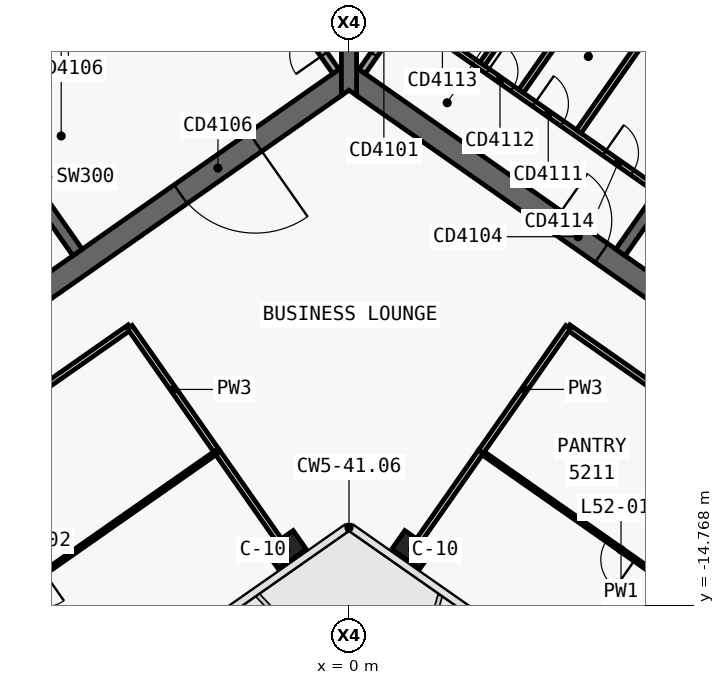
"""IFC4 building model, lengths in metres.
Left out: names, types, materials, properties, quantities, classifications, styles, units other than length and angle.
Written with IfcOpenShell. Run it as: python <this file> out.ifc"""

import sys

from ifc_helpers import new_model, si_unit, direction, frame, frame_2d, origin, origin_2d, place, context, subcontext, project, spatial, polyline, rectangle, outline, extrude, element, fill, save


model = new_model("IFC4")
c1 = context("Model", 3, precision=1e-05, world=origin(), true_north=direction((0.0, 1.0)))
c2 = subcontext(c1, "Body", "Model", "MODEL_VIEW")
j1 = project(units=[si_unit("LENGTHUNIT", "METRE"), si_unit("PLANEANGLEUNIT", "RADIAN")], contexts=[c1])
p1 = place(None, origin())
s1 = spatial("IfcSite", under=j1, at=p1, CompositionType="ELEMENT")
p2 = place(p1, origin())
s2 = spatial("IfcBuilding", under=s1, at=p2, CompositionType="ELEMENT")
p3 = place(p2, frame((0.0, 0.0, 225.4)))
s3 = spatial("IfcBuildingStorey", under=s2, at=p3, CompositionType="ELEMENT", Elevation=225.4)
p4 = place(p3, frame((-0.028, 12.066, 0.0), z_axis=(0.0, 0.0, 1.0), x_axis=(-0.819151382952, -0.573577380837, 0.0)))
e1 = element("IfcWall", 1, at=p4, inside=s3, PredefinedType="SHEAR", context=c2, shape_type="SweptSolid", body=[
    extrude(outline(polyline([(33.898, 0.3), (0.42, 0.3), (0.0, -0.3), (33.898, -0.3), (33.898, 0.3)])), origin(), (0.0, 0.0, 1.0), 3.9),
])
p5 = place(p3, frame((-0.028, -0.874, 0.0), z_axis=(0.0, 0.0, 1.0), x_axis=(-0.819150035022, -0.573579305871, 0.0)))
e2 = element("IfcWall", 2, at=p5, inside=s3, PredefinedType="SHEAR", context=c2, shape_type="SweptSolid", body=[
    extrude(outline(polyline([(26.476, 0.3), (0.42, 0.3), (0.0, -0.3), (26.476, -0.3), (26.476, 0.3)])), origin(), (0.0, 0.0, 1.0), 3.9),
])
p6 = place(p5, frame((2.976, 0.0, 0.0)))
e3 = element("IfcOpeningElement", 3, at=p6, cuts=e2, PredefinedType="OPENING", context=c2, shape_type="SweptSolid", body=[
    extrude(rectangle(XDim=2.4, YDim=2.1, at=frame_2d((1.2, 1.05))), frame((0.0, 0.31, 0.0), z_axis=(0.0, -1.0, 0.0), x_axis=(1.0, 0.0, 0.0)), (0.0, 0.0, 1.0), 0.62),
])
p7 = place(p5, frame((11.776, 0.0, 0.0)))
e4 = element("IfcOpeningElement", 4, at=p7, cuts=e2, PredefinedType="OPENING", context=c2, shape_type="SweptSolid", body=[
    extrude(rectangle(XDim=2.4, YDim=2.1, at=frame_2d((1.2, 1.05))), frame((0.0, 0.31, 0.0), z_axis=(0.0, -1.0, 0.0), x_axis=(1.0, 0.0, 0.0)), (0.0, 0.0, 1.0), 0.62),
])
p8 = place(p3, frame((-7.143, -5.49, 0.0), z_axis=(0.0, 0.0, 1.0), x_axis=(-0.573617744349, 0.819123118565, 0.0)))
e5 = element("IfcWall", 5, at=p8, inside=s3, PredefinedType="SHEAR", context=c2, shape_type="SweptSolid", body=[
    extrude(outline(polyline([(4.85, 0.15), (0.0, 0.15), (0.0, -0.15), (4.85, -0.15), (4.85, 0.15)])), origin(), (0.0, 0.0, 1.0), 3.9),
])
p9 = place(p3, frame((-2.638, 3.768, 0.0), z_axis=(0.0, 0.0, 1.0), x_axis=(-0.819155014212, -0.573572194837, 0.0)))
e6 = element("IfcWall", 6, at=p9, inside=s3, PredefinedType="SHEAR", context=c2, shape_type="SweptSolid", body=[
    extrude(outline(polyline([(26.4, 0.15), (0.0, 0.15), (0.0, -0.15), (26.4, -0.15), (26.4, 0.15)])), origin(), (0.0, 0.0, 1.0), 3.9),
])
p10 = place(p9, frame((1.169, 0.0, 0.0)))
e7 = element("IfcOpeningElement", 7, at=p10, cuts=e6, PredefinedType="OPENING", context=c2, shape_type="SweptSolid", body=[
    extrude(rectangle(XDim=1.1, YDim=2.1, at=frame_2d((0.55, 1.05))), frame((0.0, 0.16, 0.0), z_axis=(0.0, -1.0, 0.0), x_axis=(1.0, 0.0, 0.0)), (0.0, 0.0, 1.0), 0.32),
])
p11 = place(p9, frame((3.206, 0.0, 0.0)))
e8 = element("IfcOpeningElement", 8, at=p11, cuts=e6, PredefinedType="OPENING", context=c2, shape_type="SweptSolid", body=[
    extrude(rectangle(XDim=1.1, YDim=2.1, at=frame_2d((0.55, 1.05))), frame((0.0, 0.16, 0.0), z_axis=(0.0, -1.0, 0.0), x_axis=(1.0, 0.0, 0.0)), (0.0, 0.0, 1.0), 0.32),
])
p12 = place(p9, frame((5.244, 0.0, 0.0)))
e9 = element("IfcOpeningElement", 9, at=p12, cuts=e6, PredefinedType="OPENING", context=c2, shape_type="SweptSolid", body=[
    extrude(rectangle(XDim=1.1, YDim=2.1, at=frame_2d((0.55, 1.05))), frame((0.0, 0.16, 0.0), z_axis=(0.0, -1.0, 0.0), x_axis=(1.0, 0.0, 0.0)), (0.0, 0.0, 1.0), 0.32),
])
p13 = place(p9, frame((7.281, 0.0, 0.0)))
e10 = element("IfcOpeningElement", 10, at=p13, cuts=e6, PredefinedType="OPENING", context=c2, shape_type="SweptSolid", body=[
    extrude(rectangle(XDim=1.1, YDim=2.1, at=frame_2d((0.55, 1.05))), frame((0.0, 0.16, 0.0), z_axis=(0.0, -1.0, 0.0), x_axis=(1.0, 0.0, 0.0)), (0.0, 0.0, 1.0), 0.32),
])
p14 = place(p9, frame((9.688, 0.0, 0.0)))
e11 = element("IfcOpeningElement", 11, at=p14, cuts=e6, PredefinedType="OPENING", context=c2, shape_type="SweptSolid", body=[
    extrude(rectangle(XDim=1.1, YDim=2.1, at=frame_2d((0.55, 1.05))), frame((0.0, 0.16, 0.0), z_axis=(0.0, -1.0, 0.0), x_axis=(1.0, 0.0, 0.0)), (0.0, 0.0, 1.0), 0.32),
])
p15 = place(p9, frame((11.863, 0.0, 0.0)))
e12 = element("IfcOpeningElement", 12, at=p15, cuts=e6, PredefinedType="OPENING", context=c2, shape_type="SweptSolid", body=[
    extrude(rectangle(XDim=1.1, YDim=2.1, at=frame_2d((0.55, 1.05))), frame((0.0, 0.16, 0.0), z_axis=(0.0, -1.0, 0.0), x_axis=(1.0, 0.0, 0.0)), (0.0, 0.0, 1.0), 0.32),
])
p16 = place(p9, frame((14.552, 0.0, 0.0)))
e13 = element("IfcOpeningElement", 13, at=p16, cuts=e6, PredefinedType="OPENING", context=c2, shape_type="SweptSolid", body=[
    extrude(rectangle(XDim=1.0, YDim=2.1, at=frame_2d((0.5, 1.05))), frame((0.0, 0.16, 0.0), z_axis=(0.0, -1.0, 0.0), x_axis=(1.0, 0.0, 0.0)), (0.0, 0.0, 1.0), 0.32),
])
p17 = place(p9, frame((16.627, 0.0, 0.0)))
e14 = element("IfcOpeningElement", 14, at=p17, cuts=e6, PredefinedType="OPENING", context=c2, shape_type="SweptSolid", body=[
    extrude(rectangle(XDim=1.0, YDim=2.1, at=frame_2d((0.5, 1.05))), frame((0.0, 0.16, 0.0), z_axis=(0.0, -1.0, 0.0), x_axis=(1.0, 0.0, 0.0)), (0.0, 0.0, 1.0), 0.32),
])
p18 = place(p3, frame((0.028, 12.066, 0.0), z_axis=(0.0, 0.0, 1.0), x_axis=(0.819151382952, -0.573577380837, 0.0)))
e15 = element("IfcWall", 15, at=p18, inside=s3, PredefinedType="SHEAR", context=c2, shape_type="SweptSolid", body=[
    extrude(outline(polyline([(33.898, 0.3), (0.0, 0.3), (0.42, -0.3), (33.898, -0.3), (33.898, 0.3)])), origin(), (0.0, 0.0, 1.0), 3.9),
])
p19 = place(p3, frame((0.028, -0.874, 0.0), z_axis=(0.0, 0.0, 1.0), x_axis=(0.819150035022, -0.573579305871, 0.0)))
e16 = element("IfcWall", 16, at=p19, inside=s3, PredefinedType="SHEAR", context=c2, shape_type="SweptSolid", body=[
    extrude(outline(polyline([(26.476, 0.3), (0.0, 0.3), (0.42, -0.3), (26.476, -0.3), (26.476, 0.3)])), origin(), (0.0, 0.0, 1.0), 3.9),
])
p20 = place(p19, frame((6.576, 0.0, 0.0)))
e17 = element("IfcOpeningElement", 17, at=p20, cuts=e16, PredefinedType="OPENING", context=c2, shape_type="SweptSolid", body=[
    extrude(rectangle(XDim=1.5, YDim=2.1, at=frame_2d((0.75, 1.05))), frame((0.0, 0.31, 0.0), z_axis=(0.0, -1.0, 0.0), x_axis=(1.0, 0.0, 0.0)), (0.0, 0.0, 1.0), 0.62),
])
p21 = place(p19, frame((12.226, 0.0, 0.0)))
e18 = element("IfcOpeningElement", 18, at=p21, cuts=e16, PredefinedType="OPENING", context=c2, shape_type="SweptSolid", body=[
    extrude(rectangle(XDim=1.5, YDim=2.1, at=frame_2d((0.75, 1.05))), frame((0.0, 0.31, 0.0), z_axis=(0.0, -1.0, 0.0), x_axis=(1.0, 0.0, 0.0)), (0.0, 0.0, 1.0), 0.62),
])
p22 = place(p3, frame((7.143, -5.49, 0.0), z_axis=(0.0, 0.0, 1.0), x_axis=(0.573617744349, 0.819123118565, 0.0)))
e19 = element("IfcWall", 19, at=p22, inside=s3, PredefinedType="SHEAR", context=c2, shape_type="SweptSolid", body=[
    extrude(outline(polyline([(0.0, 0.15), (0.0, -0.15), (4.85, -0.15), (4.85, 0.15), (0.0, 0.15)])), origin(), (0.0, 0.0, 1.0), 3.9),
])
p23 = place(p3, frame((2.638, 3.768, 0.0), z_axis=(0.0, 0.0, 1.0), x_axis=(0.819155014212, -0.573572194837, 0.0)))
e20 = element("IfcWall", 20, at=p23, inside=s3, PredefinedType="SHEAR", context=c2, shape_type="SweptSolid", body=[
    extrude(outline(polyline([(0.0, 0.15), (0.0, -0.15), (26.4, -0.15), (26.4, 0.15), (0.0, 0.15)])), origin(), (0.0, 0.0, 1.0), 3.9),
])
p24 = place(p23, frame((9.637, 0.0, 0.0)))
e21 = element("IfcOpeningElement", 21, at=p24, cuts=e20, PredefinedType="OPENING", context=c2, shape_type="SweptSolid", body=[
    extrude(rectangle(XDim=1.2, YDim=2.1, at=frame_2d((0.6, 1.05))), frame((0.0, 0.16, 0.0), z_axis=(0.0, -1.0, 0.0), x_axis=(1.0, 0.0, 0.0)), (0.0, 0.0, 1.0), 0.32),
])
p25 = place(p23, frame((11.812, 0.0, 0.0)))
e22 = element("IfcOpeningElement", 22, at=p25, cuts=e20, PredefinedType="OPENING", context=c2, shape_type="SweptSolid", body=[
    extrude(rectangle(XDim=1.2, YDim=2.1, at=frame_2d((0.6, 1.05))), frame((0.0, 0.16, 0.0), z_axis=(0.0, -1.0, 0.0), x_axis=(1.0, 0.0, 0.0)), (0.0, 0.0, 1.0), 0.32),
])
p26 = place(p23, frame((13.988, 0.0, 0.0)))
e23 = element("IfcOpeningElement", 23, at=p26, cuts=e20, PredefinedType="OPENING", context=c2, shape_type="SweptSolid", body=[
    extrude(rectangle(XDim=1.2, YDim=2.1, at=frame_2d((0.6, 1.05))), frame((0.0, 0.16, 0.0), z_axis=(0.0, -1.0, 0.0), x_axis=(1.0, 0.0, 0.0)), (0.0, 0.0, 1.0), 0.32),
])
p27 = place(p23, frame((16.262, 0.0, 0.0)))
e24 = element("IfcOpeningElement", 24, at=p27, cuts=e20, PredefinedType="OPENING", context=c2, shape_type="SweptSolid", body=[
    extrude(rectangle(XDim=1.0, YDim=2.1, at=frame_2d((0.5, 1.05))), frame((0.0, 0.16, 0.0), z_axis=(0.0, -1.0, 0.0), x_axis=(1.0, 0.0, 0.0)), (0.0, 0.0, 1.0), 0.32),
])
p28 = place(p3, frame((0.0, -1.361, 0.0), z_axis=(0.0, 0.0, 1.0), x_axis=(0.0, 1.0, 0.0)))
e25 = element("IfcWall", 25, at=p28, inside=s3, PredefinedType="SHEAR", context=c2, shape_type="SweptSolid", body=[
    extrude(outline(polyline([(0.14, 0.2), (0.0, 0.2), (0.14, 0.0), (0.0, -0.2), (0.14, -0.2), (1.012, -0.2), (12.94, -0.2), (13.813, -0.2), (13.893, -0.2), (13.933, -0.172), (13.813, 0.0), (13.933, 0.172), (13.893, 0.2), (13.813, 0.2), (12.94, 0.2), (1.012, 0.2), (0.14, 0.2)])), origin(), (0.0, 0.0, 1.0), 3.9),
])
for number, where, z_axis, x_axis in (
    (26, (-1.665, -13.313, 0.0), (0.0, 0.0, 1.0), (-0.819, -0.574, 0.0)),
    (27, (1.665, -13.313, 0.0), (0.0, 0.0, 1.0), (0.819, -0.574, 0.0)),
):
    element("IfcColumn", number, at=place(p3, frame(where, z_axis=z_axis, x_axis=x_axis)), inside=s3, PredefinedType="COLUMN", context=c2, shape_type="SweptSolid", body=[
        extrude(rectangle(XDim=0.9, YDim=0.6, at=origin_2d()), origin(), (0.0, 0.0, 1.0), 3.9),
    ])
p29 = place(p3, frame((1.516, 0.77, 0.0), z_axis=(0.0, 0.0, 1.0), x_axis=(0.819146424436, -0.573584462249, 0.0)))
e28 = element("IfcWall", 28, at=p29, inside=s3, PredefinedType="PARTITIONING", context=c2, shape_type="SweptSolid", body=[
    extrude(rectangle(XDim=8.05, YDim=0.15, at=frame_2d((4.025, 0.0))), origin(), (0.0, 0.0, 1.0), 3.62),
])
p30 = place(p29, frame((0.7, 0.0, 0.0)))
e29 = element("IfcOpeningElement", 29, at=p30, cuts=e28, PredefinedType="OPENING", context=c2, shape_type="SweptSolid", body=[
    extrude(rectangle(XDim=0.9, YDim=2.1, at=frame_2d((0.45, 1.05))), frame((0.0, 0.085, 0.0), z_axis=(0.0, -1.0, 0.0), x_axis=(1.0, 0.0, 0.0)), (0.0, 0.0, 1.0), 0.17),
])
p31 = place(p29, frame((2.6, 0.0, 0.0)))
e30 = element("IfcOpeningElement", 30, at=p31, cuts=e28, PredefinedType="OPENING", context=c2, shape_type="SweptSolid", body=[
    extrude(rectangle(XDim=0.8, YDim=2.1, at=frame_2d((0.4, 1.05))), frame((0.0, 0.085, 0.0), z_axis=(0.0, -1.0, 0.0), x_axis=(1.0, 0.0, 0.0)), (0.0, 0.0, 1.0), 0.17),
])
p32 = place(p29, frame((4.1, 0.0, 0.0)))
e31 = element("IfcOpeningElement", 31, at=p32, cuts=e28, PredefinedType="OPENING", context=c2, shape_type="SweptSolid", body=[
    extrude(rectangle(XDim=0.9, YDim=2.1, at=frame_2d((0.45, 1.05))), frame((0.0, 0.085, 0.0), z_axis=(0.0, -1.0, 0.0), x_axis=(1.0, 0.0, 0.0)), (0.0, 0.0, 1.0), 0.17),
])
p33 = place(p29, frame((6.35, 0.0, 0.0)))
e32 = element("IfcOpeningElement", 32, at=p33, cuts=e28, PredefinedType="OPENING", context=c2, shape_type="SweptSolid", body=[
    extrude(rectangle(XDim=0.9, YDim=2.1, at=frame_2d((0.45, 1.05))), frame((0.0, 0.085, 0.0), z_axis=(0.0, -1.0, 0.0), x_axis=(1.0, 0.0, 0.0)), (0.0, 0.0, 1.0), 0.17),
])
p34 = place(p3, frame((3.504, -0.531, 0.0), z_axis=(0.0, 0.0, 1.0), x_axis=(0.573582013179, 0.819148139324, 0.0)))
e33 = element("IfcWall", 33, at=p34, inside=s3, PredefinedType="PARTITIONING", context=c2, shape_type="SweptSolid", body=[
    extrude(rectangle(XDim=2.875, YDim=0.15, at=frame_2d((1.438, 0.0))), origin(), (0.0, 0.0, 1.0), 3.62),
])
p35 = place(p3, frame((4.528, -1.248, 0.0), z_axis=(0.0, 0.0, 1.0), x_axis=(0.573621911162, 0.819120200602, 0.0)))
e34 = element("IfcWall", 34, at=p35, inside=s3, PredefinedType="PARTITIONING", context=c2, shape_type="SweptSolid", body=[
    extrude(rectangle(XDim=2.875, YDim=0.15, at=frame_2d((1.438, 0.0))), origin(), (0.0, 0.0, 1.0), 3.62),
])
p36 = place(p3, frame((6.044, -2.309, 0.0), z_axis=(0.0, 0.0, 1.0), x_axis=(0.573564930514, 0.819160100642, 0.0)))
e35 = element("IfcWall", 35, at=p36, inside=s3, PredefinedType="PARTITIONING", context=c2, shape_type="SweptSolid", body=[
    extrude(rectangle(XDim=2.875, YDim=0.15, at=frame_2d((1.438, 0.0))), origin(), (0.0, 0.0, 1.0), 3.62),
])
p37 = place(p3, frame((-0.344, -0.729, 0.0), z_axis=(0.0, 0.0, 1.0), x_axis=(-0.573560315113, 0.819163332265, 0.0)))
e36 = element("IfcWall", 36, at=p37, inside=s3, PredefinedType="SOLIDWALL", context=c2, shape_type="SweptSolid", body=[
    extrude(rectangle(XDim=4.85, YDim=0.2, at=frame_2d((2.425, 0.0))), origin(), (0.0, 0.0, 1.0), 3.62),
])
p38 = place(p37, frame((0.55, 0.0, 0.0)))
e37 = element("IfcOpeningElement", 37, at=p38, cuts=e36, PredefinedType="OPENING", context=c2, shape_type="SweptSolid", body=[
    extrude(rectangle(XDim=0.9, YDim=2.1, at=frame_2d((0.45, 1.05))), frame((0.0, 0.11, 0.0), z_axis=(0.0, -1.0, 0.0), x_axis=(1.0, 0.0, 0.0)), (0.0, 0.0, 1.0), 0.22),
])
p39 = place(p3, frame((0.344, -0.729, 0.0), z_axis=(0.0, 0.0, 1.0), x_axis=(0.573560315113, 0.819163332265, 0.0)))
e38 = element("IfcWall", 38, at=p39, inside=s3, PredefinedType="SOLIDWALL", context=c2, shape_type="SweptSolid", body=[
    extrude(rectangle(XDim=4.85, YDim=0.2, at=frame_2d((2.425, 0.0))), origin(), (0.0, 0.0, 1.0), 3.62),
])
p40 = place(p39, frame((0.55, 0.0, 0.0)))
e39 = element("IfcOpeningElement", 39, at=p40, cuts=e38, PredefinedType="OPENING", context=c2, shape_type="SweptSolid", body=[
    extrude(rectangle(XDim=0.9, YDim=2.1, at=frame_2d((0.45, 1.05))), frame((0.0, 0.11, 0.0), z_axis=(0.0, -1.0, 0.0), x_axis=(1.0, 0.0, 0.0)), (0.0, 0.0, 1.0), 0.22),
])
p41 = place(p3, frame((13.14, -12.619, 0.0), z_axis=(0.0, 0.0, 1.0), x_axis=(-0.81915291695, 0.57357519006, 0.0)))
e40 = element("IfcWall", 40, at=p41, inside=s3, PredefinedType="PARTITIONING", context=c2, shape_type="SweptSolid", body=[
    extrude(rectangle(XDim=9.002, YDim=0.15, at=frame_2d((4.501, 0.0))), origin(), (0.0, 0.0, 1.0), 3.05),
])
p42 = place(p41, frame((3.701, 0.0, 0.0)))
e41 = element("IfcOpeningElement", 41, at=p42, cuts=e40, PredefinedType="OPENING", context=c2, shape_type="SweptSolid", body=[
    extrude(rectangle(XDim=1.6, YDim=2.1, at=frame_2d((0.8, 1.05))), frame((0.0, 0.085, 0.0), z_axis=(0.0, -1.0, 0.0), x_axis=(1.0, 0.0, 0.0)), (0.0, 0.0, 1.0), 0.17),
])
p43 = place(p3, frame((-5.766, -7.456, 0.0), z_axis=(0.0, 0.0, 1.0), x_axis=(-0.81915546166, -0.573571555809, 0.0)))
e42 = element("IfcWall", 42, at=p43, inside=s3, PredefinedType="PARTITIONING", context=c2, shape_type="SweptSolid", body=[
    extrude(rectangle(XDim=12.002, YDim=0.15, at=frame_2d((6.001, 0.0))), origin(), (0.0, 0.0, 1.0), 3.05),
])
p44 = place(p43, frame((5.201, 0.0, 0.0)))
e43 = element("IfcOpeningElement", 43, at=p44, cuts=e42, PredefinedType="OPENING", context=c2, shape_type="SweptSolid", body=[
    extrude(rectangle(XDim=1.6, YDim=2.1, at=frame_2d((0.8, 1.05))), frame((0.0, 0.085, 0.0), z_axis=(0.0, -1.0, 0.0), x_axis=(1.0, 0.0, 0.0)), (0.0, 0.0, 1.0), 0.17),
])
p45 = place(p3, frame((10.844, -15.896, 0.0), z_axis=(0.0, 0.0, 1.0), x_axis=(-0.819141427692, 0.573591598124, 0.0)))
e44 = element("IfcWall", 44, at=p45, inside=s3, PredefinedType="PARTITIONING", context=c2, shape_type="SweptSolid", body=[
    extrude(rectangle(XDim=9.0, YDim=0.1, at=frame_2d((4.5, 0.0))), origin(), (0.0, 0.0, 1.0), 3.05),
])
p46 = place(p45, frame((4.05, 0.0, 0.0)))
e45 = element("IfcOpeningElement", 45, at=p46, cuts=e44, PredefinedType="OPENING", context=c2, shape_type="SweptSolid", body=[
    extrude(rectangle(XDim=0.9, YDim=2.1, at=frame_2d((0.45, 1.05))), frame((0.0, 0.06, 0.0), z_axis=(0.0, -1.0, 0.0), x_axis=(1.0, 0.0, 0.0)), (0.0, 0.0, 1.0), 0.12),
])
p47 = place(p3, frame((1.849, -13.051, 0.0), z_axis=(0.0, 0.0, 1.0), x_axis=(0.573555012677, 0.819167044889, 0.0)))
e46 = element("IfcWall", 46, at=p47, inside=s3, PredefinedType="PARTITIONING", context=c2, shape_type="SweptSolid", body=[
    extrude(rectangle(XDim=2.829, YDim=0.15, at=frame_2d((1.415, 0.0))), origin(), (0.0, 0.0, 1.0), 3.05),
])
p48 = place(p3, frame((3.472, -10.732, 0.0), z_axis=(0.0, 0.0, 1.0), x_axis=(0.573597512525, 0.819137286189, 0.0)))
e47 = element("IfcWall", 47, at=p48, inside=s3, PredefinedType="PARTITIONING", context=c2, shape_type="SweptSolid", body=[
    extrude(rectangle(XDim=4.0, YDim=0.15, at=frame_2d((2.0, 0.0))), origin(), (0.0, 0.0, 1.0), 3.05),
])
p49 = place(p3, frame((-1.849, -13.051, 0.0), z_axis=(0.0, 0.0, 1.0), x_axis=(-0.57360125079, 0.819134668472, 0.0)))
e48 = element("IfcWall", 48, at=p49, inside=s3, PredefinedType="PARTITIONING", context=c2, shape_type="SweptSolid", body=[
    extrude(rectangle(XDim=2.831, YDim=0.15, at=frame_2d((1.416, 0.0))), origin(), (0.0, 0.0, 1.0), 3.05),
])
p50 = place(p3, frame((-3.471, -10.734, 0.0), z_axis=(0.0, 0.0, 1.0), x_axis=(-0.573564642091, 0.819160302593, 0.0)))
e49 = element("IfcWall", 49, at=p50, inside=s3, PredefinedType="PARTITIONING", context=c2, shape_type="SweptSolid", body=[
    extrude(rectangle(XDim=4.004, YDim=0.15, at=frame_2d((2.002, 0.0))), origin(), (0.0, 0.0, 1.0), 3.05),
])
p51 = place(p3, frame((-3.471, -10.733, 0.0), z_axis=(0.0, 0.0, 1.0), x_axis=(-0.819146845232, -0.573583861302, 0.0)))
e50 = element("IfcWall", 50, at=p51, inside=s3, PredefinedType="PARTITIONING", context=c2, shape_type="SweptSolid", body=[
    extrude(rectangle(XDim=12.0, YDim=0.1, at=frame_2d((6.0, 0.0))), origin(), (0.0, 0.0, 1.0), 3.05),
])
p52 = place(p51, frame((5.55, 0.0, 0.0)))
e51 = element("IfcOpeningElement", 51, at=p52, cuts=e50, PredefinedType="OPENING", context=c2, shape_type="SweptSolid", body=[
    extrude(rectangle(XDim=0.9, YDim=2.1, at=frame_2d((0.45, 1.05))), frame((0.0, 0.06, 0.0), z_axis=(0.0, -1.0, 0.0), x_axis=(1.0, 0.0, 0.0)), (0.0, 0.0, 1.0), 0.12),
])
p53 = place(p6, origin())
e52 = element("IfcDoor", 52, at=p53, inside=s3, OperationType="DOUBLE_DOOR_SINGLE_SWING", PredefinedType="DOOR", context=c2, shape_type="SweptSolid", body=[
    extrude(rectangle(XDim=2.4, YDim=2.1, at=frame_2d((1.2, 1.05))), frame((0.0, 0.025, 0.0), z_axis=(0.0, -1.0, 0.0), x_axis=(1.0, 0.0, 0.0)), (0.0, 0.0, 1.0), 0.05),
])
fill(e3, e52)
p54 = place(p31, origin())
e53 = element("IfcDoor", 53, at=p54, inside=s3, OperationType="SINGLE_SWING_RIGHT", PredefinedType="DOOR", context=c2, shape_type="SweptSolid", body=[
    extrude(rectangle(XDim=0.8, YDim=2.1, at=frame_2d((0.4, 1.05))), frame((0.0, 0.025, 0.0), z_axis=(0.0, -1.0, 0.0), x_axis=(1.0, 0.0, 0.0)), (0.0, 0.0, 1.0), 0.05),
])
fill(e30, e53)
p55 = place(p32, origin())
e54 = element("IfcDoor", 54, at=p55, inside=s3, OperationType="SINGLE_SWING_RIGHT", PredefinedType="DOOR", context=c2, shape_type="SweptSolid", body=[
    extrude(rectangle(XDim=0.9, YDim=2.1, at=frame_2d((0.45, 1.05))), frame((0.0, 0.025, 0.0), z_axis=(0.0, -1.0, 0.0), x_axis=(1.0, 0.0, 0.0)), (0.0, 0.0, 1.0), 0.05),
])
fill(e31, e54)
p56 = place(p33, origin())
e55 = element("IfcDoor", 55, at=p56, inside=s3, OperationType="SINGLE_SWING_RIGHT", PredefinedType="DOOR", context=c2, shape_type="SweptSolid", body=[
    extrude(rectangle(XDim=0.9, YDim=2.1, at=frame_2d((0.45, 1.05))), frame((0.0, 0.025, 0.0), z_axis=(0.0, -1.0, 0.0), x_axis=(1.0, 0.0, 0.0)), (0.0, 0.0, 1.0), 0.05),
])
fill(e32, e55)
p57 = place(p20, origin())
e56 = element("IfcDoor", 56, at=p57, inside=s3, OperationType="SINGLE_SWING_RIGHT", PredefinedType="DOOR", context=c2, shape_type="SweptSolid", body=[
    extrude(rectangle(XDim=1.5, YDim=2.1, at=frame_2d((0.75, 1.05))), frame((0.0, 0.025, 0.0), z_axis=(0.0, -1.0, 0.0), x_axis=(1.0, 0.0, 0.0)), (0.0, 0.0, 1.0), 0.05),
])
fill(e17, e56)
p58 = place(p38, origin())
e57 = element("IfcDoor", 57, at=p58, inside=s3, OperationType="SINGLE_SWING_RIGHT", PredefinedType="DOOR", context=c2, shape_type="SweptSolid", body=[
    extrude(rectangle(XDim=0.9, YDim=2.1, at=frame_2d((0.45, 1.05))), frame((0.0, 0.025, 0.0), z_axis=(0.0, -1.0, 0.0), x_axis=(1.0, 0.0, 0.0)), (0.0, 0.0, 1.0), 0.05),
])
fill(e37, e57)
p59 = place(p40, origin())
e58 = element("IfcDoor", 58, at=p59, inside=s3, OperationType="SINGLE_SWING_RIGHT", PredefinedType="DOOR", context=c2, shape_type="SweptSolid", body=[
    extrude(rectangle(XDim=0.9, YDim=2.1, at=frame_2d((0.45, 1.05))), frame((0.0, 0.025, 0.0), z_axis=(0.0, -1.0, 0.0), x_axis=(1.0, 0.0, 0.0)), (0.0, 0.0, 1.0), 0.05),
])
fill(e39, e58)
p60 = place(p46, origin())
e59 = element("IfcDoor", 59, at=p60, inside=s3, OperationType="SINGLE_SWING_LEFT", PredefinedType="DOOR", context=c2, shape_type="SweptSolid", body=[
    extrude(rectangle(XDim=0.9, YDim=2.1, at=frame_2d((0.45, 1.05))), frame((0.0, 0.025, 0.0), z_axis=(0.0, -1.0, 0.0), x_axis=(1.0, 0.0, 0.0)), (0.0, 0.0, 1.0), 0.05),
])
fill(e45, e59)
save(model, sys.argv[1])
